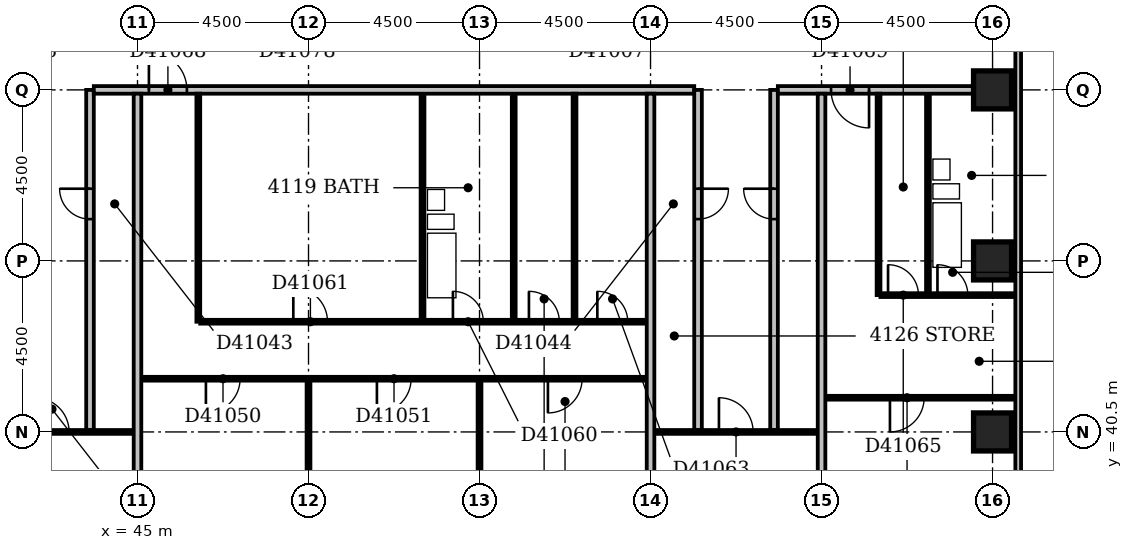
"""IFC4 building model, lengths in metres.
Left out: names, types, materials, properties, quantities, classifications, styles, units other than length and angle.
Written with IfcOpenShell. Run it as: python <this file> out.ifc"""

import sys

from ifc_helpers import new_model, si_unit, direction, frame, frame_2d, origin, origin_2d, place, context, subcontext, project, spatial, rectangle, extrude, element, fill, save


model = new_model("IFC4")
c1 = context("Model", 3, precision=1e-05, world=origin(), true_north=direction((0.0, 1.0)))
c2 = subcontext(c1, "Body", "Model", "MODEL_VIEW")
j1 = project(units=[si_unit("LENGTHUNIT", "METRE"), si_unit("PLANEANGLEUNIT", "RADIAN")], contexts=[c1])
p1 = place(None, origin())
s1 = spatial("IfcSite", under=j1, at=p1, CompositionType="ELEMENT")
p2 = place(p1, origin())
s2 = spatial("IfcBuilding", under=s1, at=p2, CompositionType="ELEMENT")
p3 = place(p2, frame((0.0, 0.0, 162.8)))
s3 = spatial("IfcBuildingStorey", under=s2, at=p3, CompositionType="ELEMENT", Elevation=162.8)
for number, where, z_axis, x_axis in (
    (1, (67.5, 40.5, -0.3), (0.0, 0.0, 1.0), (1.0, 0.0, 0.0)),
    (2, (67.5, 45.0, -0.3), (0.0, 0.0, 1.0), (1.0, 0.0, 0.0)),
    (3, (67.5, 49.5, -0.3), (0.0, 0.0, 1.0), (1.0, 0.0, 0.0)),
):
    element("IfcColumn", number, at=place(p3, frame(where, z_axis=z_axis, x_axis=x_axis)), inside=s3, PredefinedType="COLUMN", context=c2, shape_type="SweptSolid", body=[
        extrude(rectangle(XDim=1.0, YDim=1.0, at=origin_2d()), origin(), (0.0, 0.0, 1.0), 3.6),
    ])
p4 = place(p3, frame((68.175, 35.4, 0.0), z_axis=(0.0, 0.0, 1.0), x_axis=(0.0, 1.0, 0.0)))
e4 = element("IfcWall", 4, at=p4, inside=s3, PredefinedType="STANDARD", context=c2, shape_type="SweptSolid", body=[
    extrude(rectangle(XDim=23.85, YDim=0.15, at=frame_2d((11.925, 0.0))), origin(), (0.0, 0.0, 1.0), 2.7),
])
p5 = place(p4, frame((1.65, 0.0, 0.6)))
e5 = element("IfcOpeningElement", 5, at=p5, cuts=e4, PredefinedType="OPENING", context=c2, shape_type="SweptSolid", body=[
    extrude(rectangle(XDim=2.4, YDim=1.8, at=frame_2d((1.2, 0.9))), frame((0.0, 0.087, 0.0), z_axis=(0.0, -1.0, 0.0), x_axis=(1.0, 0.0, 0.0)), (0.0, 0.0, 1.0), 0.174),
])
p6 = place(p4, frame((19.65, 0.0, 0.6)))
e6 = element("IfcOpeningElement", 6, at=p6, cuts=e4, PredefinedType="OPENING", context=c2, shape_type="SweptSolid", body=[
    extrude(rectangle(XDim=2.4, YDim=1.8, at=frame_2d((1.2, 0.9))), frame((0.0, 0.087, 0.0), z_axis=(0.0, -1.0, 0.0), x_axis=(1.0, 0.0, 0.0)), (0.0, 0.0, 1.0), 0.174),
])
p7 = place(p3, frame((45.0, 36.5, 0.0), z_axis=(0.0, 0.0, 1.0), x_axis=(0.0, 1.0, 0.0)))
e7 = element("IfcWall", 7, at=p7, inside=s3, PredefinedType="PARTITIONING", context=c2, shape_type="SweptSolid", body=[
    extrude(rectangle(XDim=12.9, YDim=0.2, at=frame_2d((6.45, 0.0))), origin(), (0.0, 0.0, 1.0), 2.6),
])
p8 = place(p3, frame((49.5, 36.5, 0.0), z_axis=(0.0, 0.0, 1.0), x_axis=(0.0, 1.0, 0.0)))
e8 = element("IfcWall", 8, at=p8, inside=s3, PredefinedType="PARTITIONING", context=c2, shape_type="SweptSolid", body=[
    extrude(rectangle(XDim=5.35, YDim=0.1, at=frame_2d((2.675, 0.0))), origin(), (0.0, 0.0, 1.0), 3.3),
])
p9 = place(p3, frame((54.0, 36.5, 0.0), z_axis=(0.0, 0.0, 1.0), x_axis=(0.0, 1.0, 0.0)))
e9 = element("IfcWall", 9, at=p9, inside=s3, PredefinedType="PARTITIONING", context=c2, shape_type="SweptSolid", body=[
    extrude(rectangle(XDim=5.35, YDim=0.1, at=frame_2d((2.675, 0.0))), origin(), (0.0, 0.0, 1.0), 2.6),
])
p10 = place(p3, frame((58.5, 36.5, 0.0), z_axis=(0.0, 0.0, 1.0), x_axis=(0.0, 1.0, 0.0)))
e10 = element("IfcWall", 10, at=p10, inside=s3, PredefinedType="PARTITIONING", context=c2, shape_type="SweptSolid", body=[
    extrude(rectangle(XDim=12.9, YDim=0.2, at=frame_2d((6.45, 0.0))), origin(), (0.0, 0.0, 1.0), 3.3),
])
p11 = place(p3, frame((63.0, 36.5, 0.0), z_axis=(0.0, 0.0, 1.0), x_axis=(0.0, 1.0, 0.0)))
e11 = element("IfcWall", 11, at=p11, inside=s3, PredefinedType="PARTITIONING", context=c2, shape_type="SweptSolid", body=[
    extrude(rectangle(XDim=12.9, YDim=0.2, at=frame_2d((6.45, 0.0))), origin(), (0.0, 0.0, 1.0), 2.4),
])
p12 = place(p3, frame((40.6, 40.5, 0.0), z_axis=(0.0, 0.0, 1.0), x_axis=(1.0, 0.0, 0.0)))
e12 = element("IfcWall", 12, at=p12, inside=s3, PredefinedType="PARTITIONING", context=c2, shape_type="SweptSolid", body=[
    extrude(rectangle(XDim=4.3, YDim=0.1, at=frame_2d((2.15, 0.0))), origin(), (0.0, 0.0, 1.0), 3.3),
])
p13 = place(p12, frame((1.7, 0.0, 0.0)))
e13 = element("IfcOpeningElement", 13, at=p13, cuts=e12, PredefinedType="OPENING", context=c2, shape_type="SweptSolid", body=[
    extrude(rectangle(XDim=0.9, YDim=2.1, at=frame_2d((0.45, 1.05))), frame((0.0, 0.062, 0.0), z_axis=(0.0, -1.0, 0.0), x_axis=(1.0, 0.0, 0.0)), (0.0, 0.0, 1.0), 0.124),
])
p14 = place(p3, frame((58.6, 40.5, 0.0), z_axis=(0.0, 0.0, 1.0), x_axis=(1.0, 0.0, 0.0)))
e14 = element("IfcWall", 14, at=p14, inside=s3, PredefinedType="PARTITIONING", context=c2, shape_type="SweptSolid", body=[
    extrude(rectangle(XDim=4.3, YDim=0.1, at=frame_2d((2.15, 0.0))), origin(), (0.0, 0.0, 1.0), 3.3),
])
p15 = place(p14, frame((1.7, 0.0, 0.0)))
e15 = element("IfcOpeningElement", 15, at=p15, cuts=e14, PredefinedType="OPENING", context=c2, shape_type="SweptSolid", body=[
    extrude(rectangle(XDim=0.9, YDim=2.1, at=frame_2d((0.45, 1.05))), frame((0.0, 0.062, 0.0), z_axis=(0.0, -1.0, 0.0), x_axis=(1.0, 0.0, 0.0)), (0.0, 0.0, 1.0), 0.124),
])
p16 = place(p3, frame((43.75, 40.55, 0.0), z_axis=(0.0, 0.0, 1.0), x_axis=(0.0, 1.0, 0.0)))
e16 = element("IfcWall", 16, at=p16, inside=s3, PredefinedType="PARTITIONING", context=c2, shape_type="SweptSolid", body=[
    extrude(rectangle(XDim=8.95, YDim=0.2, at=frame_2d((4.475, 0.0))), origin(), (0.0, 0.0, 1.0), 3.3),
])
p17 = place(p16, frame((5.55, 0.0, 0.0)))
e17 = element("IfcOpeningElement", 17, at=p17, cuts=e16, PredefinedType="OPENING", context=c2, shape_type="SweptSolid", body=[
    extrude(rectangle(XDim=0.8, YDim=2.1, at=frame_2d((0.4, 1.05))), frame((0.0, 0.112, 0.0), z_axis=(0.0, -1.0, 0.0), x_axis=(1.0, 0.0, 0.0)), (0.0, 0.0, 1.0), 0.224),
])
p18 = place(p3, frame((59.75, 40.55, 0.0), z_axis=(0.0, 0.0, 1.0), x_axis=(0.0, 1.0, 0.0)))
e18 = element("IfcWall", 18, at=p18, inside=s3, PredefinedType="PARTITIONING", context=c2, shape_type="SweptSolid", body=[
    extrude(rectangle(XDim=8.95, YDim=0.2, at=frame_2d((4.475, 0.0))), origin(), (0.0, 0.0, 1.0), 3.3),
])
p19 = place(p18, frame((5.55, 0.0, 0.0)))
e19 = element("IfcOpeningElement", 19, at=p19, cuts=e18, PredefinedType="OPENING", context=c2, shape_type="SweptSolid", body=[
    extrude(rectangle(XDim=0.8, YDim=2.1, at=frame_2d((0.4, 1.05))), frame((0.0, 0.112, 0.0), z_axis=(0.0, -1.0, 0.0), x_axis=(1.0, 0.0, 0.0)), (0.0, 0.0, 1.0), 0.224),
])
p20 = place(p3, frame((61.75, 40.55, 0.0), z_axis=(0.0, 0.0, 1.0), x_axis=(0.0, 1.0, 0.0)))
e20 = element("IfcWall", 20, at=p20, inside=s3, PredefinedType="PARTITIONING", context=c2, shape_type="SweptSolid", body=[
    extrude(rectangle(XDim=8.95, YDim=0.2, at=frame_2d((4.475, 0.0))), origin(), (0.0, 0.0, 1.0), 3.3),
])
p21 = place(p20, frame((5.55, 0.0, 0.0)))
e21 = element("IfcOpeningElement", 21, at=p21, cuts=e20, PredefinedType="OPENING", context=c2, shape_type="SweptSolid", body=[
    extrude(rectangle(XDim=0.8, YDim=2.1, at=frame_2d((0.4, 1.05))), frame((0.0, 0.112, 0.0), z_axis=(0.0, -1.0, 0.0), x_axis=(1.0, 0.0, 0.0)), (0.0, 0.0, 1.0), 0.224),
])
p22 = place(p3, frame((63.1, 41.4, 0.0), z_axis=(0.0, 0.0, 1.0), x_axis=(1.0, 0.0, 0.0)))
e22 = element("IfcWall", 22, at=p22, inside=s3, PredefinedType="PARTITIONING", context=c2, shape_type="SweptSolid", body=[
    extrude(rectangle(XDim=5.0, YDim=0.1, at=frame_2d((2.5, 0.0))), origin(), (0.0, 0.0, 1.0), 3.3),
])
p23 = place(p22, frame((1.7, 0.0, 0.0)))
e23 = element("IfcOpeningElement", 23, at=p23, cuts=e22, PredefinedType="OPENING", context=c2, shape_type="SweptSolid", body=[
    extrude(rectangle(XDim=0.9, YDim=2.1, at=frame_2d((0.45, 1.05))), frame((0.0, 0.062, 0.0), z_axis=(0.0, -1.0, 0.0), x_axis=(1.0, 0.0, 0.0)), (0.0, 0.0, 1.0), 0.124),
])
p24 = place(p3, frame((45.1, 41.9, 0.0), z_axis=(0.0, 0.0, 1.0), x_axis=(1.0, 0.0, 0.0)))
e24 = element("IfcWall", 24, at=p24, inside=s3, PredefinedType="PARTITIONING", context=c2, shape_type="SweptSolid", body=[
    extrude(rectangle(XDim=13.3, YDim=0.1, at=frame_2d((6.65, 0.0))), origin(), (0.0, 0.0, 1.0), 3.3),
])
p25 = place(p24, frame((1.7, 0.0, 0.0)))
e25 = element("IfcOpeningElement", 25, at=p25, cuts=e24, PredefinedType="OPENING", context=c2, shape_type="SweptSolid", body=[
    extrude(rectangle(XDim=0.9, YDim=2.1, at=frame_2d((0.45, 1.05))), frame((0.0, 0.062, 0.0), z_axis=(0.0, -1.0, 0.0), x_axis=(1.0, 0.0, 0.0)), (0.0, 0.0, 1.0), 0.124),
])
p26 = place(p24, frame((6.2, 0.0, 0.0)))
e26 = element("IfcOpeningElement", 26, at=p26, cuts=e24, PredefinedType="OPENING", context=c2, shape_type="SweptSolid", body=[
    extrude(rectangle(XDim=0.9, YDim=2.1, at=frame_2d((0.45, 1.05))), frame((0.0, 0.062, 0.0), z_axis=(0.0, -1.0, 0.0), x_axis=(1.0, 0.0, 0.0)), (0.0, 0.0, 1.0), 0.124),
])
p27 = place(p24, frame((10.7, 0.0, 0.0)))
e27 = element("IfcOpeningElement", 27, at=p27, cuts=e24, PredefinedType="OPENING", context=c2, shape_type="SweptSolid", body=[
    extrude(rectangle(XDim=0.9, YDim=2.1, at=frame_2d((0.45, 1.05))), frame((0.0, 0.062, 0.0), z_axis=(0.0, -1.0, 0.0), x_axis=(1.0, 0.0, 0.0)), (0.0, 0.0, 1.0), 0.124),
])
p28 = place(p3, frame((46.6, 43.4, 0.0), z_axis=(0.0, 0.0, 1.0), x_axis=(0.0, 1.0, 0.0)))
e28 = element("IfcWall", 28, at=p28, inside=s3, PredefinedType="PARTITIONING", context=c2, shape_type="SweptSolid", body=[
    extrude(rectangle(XDim=6.0, YDim=0.1, at=frame_2d((3.0, 0.0))), origin(), (0.0, 0.0, 1.0), 3.3),
])
p29 = place(p3, frame((46.65, 43.4, 0.0), z_axis=(0.0, 0.0, 1.0), x_axis=(1.0, 0.0, 0.0)))
e29 = element("IfcWall", 29, at=p29, inside=s3, PredefinedType="PARTITIONING", context=c2, shape_type="SweptSolid", body=[
    extrude(rectangle(XDim=11.75, YDim=0.1, at=frame_2d((5.875, 0.0))), origin(), (0.0, 0.0, 1.0), 3.3),
])
p30 = place(p29, frame((6.65, 0.0, 0.0)))
e30 = element("IfcOpeningElement", 30, at=p30, cuts=e29, PredefinedType="OPENING", context=c2, shape_type="SweptSolid", body=[
    extrude(rectangle(XDim=0.8, YDim=2.1, at=frame_2d((0.4, 1.05))), frame((0.0, 0.062, 0.0), z_axis=(0.0, -1.0, 0.0), x_axis=(1.0, 0.0, 0.0)), (0.0, 0.0, 1.0), 0.124),
])
p31 = place(p29, frame((2.45, 0.0, 0.0)))
e31 = element("IfcOpeningElement", 31, at=p31, cuts=e29, PredefinedType="OPENING", context=c2, shape_type="SweptSolid", body=[
    extrude(rectangle(XDim=0.9, YDim=2.1, at=frame_2d((0.45, 1.05))), frame((0.0, 0.062, 0.0), z_axis=(0.0, -1.0, 0.0), x_axis=(1.0, 0.0, 0.0)), (0.0, 0.0, 1.0), 0.124),
])
p32 = place(p29, frame((8.65, 0.0, 0.0)))
e32 = element("IfcOpeningElement", 32, at=p32, cuts=e29, PredefinedType="OPENING", context=c2, shape_type="SweptSolid", body=[
    extrude(rectangle(XDim=0.8, YDim=2.1, at=frame_2d((0.4, 1.05))), frame((0.0, 0.062, 0.0), z_axis=(0.0, -1.0, 0.0), x_axis=(1.0, 0.0, 0.0)), (0.0, 0.0, 1.0), 0.124),
])
p33 = place(p29, frame((10.45, 0.0, 0.0)))
e33 = element("IfcOpeningElement", 33, at=p33, cuts=e29, PredefinedType="OPENING", context=c2, shape_type="SweptSolid", body=[
    extrude(rectangle(XDim=0.8, YDim=2.1, at=frame_2d((0.4, 1.05))), frame((0.0, 0.062, 0.0), z_axis=(0.0, -1.0, 0.0), x_axis=(1.0, 0.0, 0.0)), (0.0, 0.0, 1.0), 0.124),
])
for number, where, z_axis, x_axis in (
    (34, (52.5, 43.45, 0.0), (0.0, 0.0, 1.0), (0.0, 1.0, 0.0)),
    (35, (54.9, 43.45, 0.0), (0.0, 0.0, 1.0), (0.0, 1.0, 0.0)),
):
    element("IfcWall", number, at=place(p3, frame(where, z_axis=z_axis, x_axis=x_axis)), inside=s3, PredefinedType="PLUMBINGWALL", context=c2, shape_type="SweptSolid", body=[
        extrude(rectangle(XDim=5.95, YDim=0.1, at=frame_2d((2.975, 0.0))), origin(), (0.0, 0.0, 1.0), 3.3),
    ])
p34 = place(p3, frame((56.5, 43.45, 0.0), z_axis=(0.0, 0.0, 1.0), x_axis=(0.0, 1.0, 0.0)))
e36 = element("IfcWall", 36, at=p34, inside=s3, PredefinedType="PARTITIONING", context=c2, shape_type="SweptSolid", body=[
    extrude(rectangle(XDim=5.95, YDim=0.1, at=frame_2d((2.975, 0.0))), origin(), (0.0, 0.0, 1.0), 3.3),
])
p35 = place(p3, frame((64.5, 44.1, 0.0), z_axis=(0.0, 0.0, 1.0), x_axis=(0.0, 1.0, 0.0)))
e37 = element("IfcWall", 37, at=p35, inside=s3, PredefinedType="PARTITIONING", context=c2, shape_type="SweptSolid", body=[
    extrude(rectangle(XDim=5.3, YDim=0.1, at=frame_2d((2.65, 0.0))), origin(), (0.0, 0.0, 1.0), 3.3),
])
p36 = place(p3, frame((64.55, 44.1, 0.0), z_axis=(0.0, 0.0, 1.0), x_axis=(1.0, 0.0, 0.0)))
e38 = element("IfcWall", 38, at=p36, inside=s3, PredefinedType="PARTITIONING", context=c2, shape_type="SweptSolid", body=[
    extrude(rectangle(XDim=3.55, YDim=0.1, at=frame_2d((1.775, 0.0))), origin(), (0.0, 0.0, 1.0), 3.3),
])
p37 = place(p36, frame((1.5, 0.0, 0.0)))
e39 = element("IfcOpeningElement", 39, at=p37, cuts=e38, PredefinedType="OPENING", context=c2, shape_type="SweptSolid", body=[
    extrude(rectangle(XDim=0.8, YDim=2.1, at=frame_2d((0.4, 1.05))), frame((0.0, 0.062, 0.0), z_axis=(0.0, -1.0, 0.0), x_axis=(1.0, 0.0, 0.0)), (0.0, 0.0, 1.0), 0.124),
])
p38 = place(p36, frame((0.2, 0.0, 0.0)))
e40 = element("IfcOpeningElement", 40, at=p38, cuts=e38, PredefinedType="OPENING", context=c2, shape_type="SweptSolid", body=[
    extrude(rectangle(XDim=0.8, YDim=2.1, at=frame_2d((0.4, 1.05))), frame((0.0, 0.062, 0.0), z_axis=(0.0, -1.0, 0.0), x_axis=(1.0, 0.0, 0.0)), (0.0, 0.0, 1.0), 0.124),
])
p39 = place(p3, frame((65.8, 44.15, 0.0), z_axis=(0.0, 0.0, 1.0), x_axis=(0.0, 1.0, 0.0)))
e41 = element("IfcWall", 41, at=p39, inside=s3, PredefinedType="PLUMBINGWALL", context=c2, shape_type="SweptSolid", body=[
    extrude(rectangle(XDim=5.25, YDim=0.1, at=frame_2d((2.625, 0.0))), origin(), (0.0, 0.0, 1.0), 3.3),
])
p40 = place(p3, frame((43.85, 49.5, 0.0), z_axis=(0.0, 0.0, 1.0), x_axis=(1.0, 0.0, 0.0)))
e42 = element("IfcWall", 42, at=p40, inside=s3, PredefinedType="PARTITIONING", context=c2, shape_type="SweptSolid", body=[
    extrude(rectangle(XDim=15.8, YDim=0.2, at=frame_2d((7.9, 0.0))), origin(), (0.0, 0.0, 1.0), 3.3),
])
p41 = place(p40, frame((1.45, 0.0, 0.0)))
e43 = element("IfcOpeningElement", 43, at=p41, cuts=e42, PredefinedType="OPENING", context=c2, shape_type="SweptSolid", body=[
    extrude(rectangle(XDim=1.0, YDim=2.1, at=frame_2d((0.5, 1.05))), frame((0.0, 0.112, 0.0), z_axis=(0.0, -1.0, 0.0), x_axis=(1.0, 0.0, 0.0)), (0.0, 0.0, 1.0), 0.224),
])
p42 = place(p3, frame((61.85, 49.5, 0.0), z_axis=(0.0, 0.0, 1.0), x_axis=(1.0, 0.0, 0.0)))
e44 = element("IfcWall", 44, at=p42, inside=s3, PredefinedType="PARTITIONING", context=c2, shape_type="SweptSolid", body=[
    extrude(rectangle(XDim=5.15, YDim=0.2, at=frame_2d((2.575, 0.0))), origin(), (0.0, 0.0, 1.0), 3.3),
])
p43 = place(p42, frame((1.4, 0.0, 0.0)))
e45 = element("IfcOpeningElement", 45, at=p43, cuts=e44, PredefinedType="OPENING", context=c2, shape_type="SweptSolid", body=[
    extrude(rectangle(XDim=1.0, YDim=2.1, at=frame_2d((0.5, 1.05))), frame((0.0, 0.112, 0.0), z_axis=(0.0, -1.0, 0.0), x_axis=(1.0, 0.0, 0.0)), (0.0, 0.0, 1.0), 0.224),
])
p44 = place(p13, origin())
e46 = element("IfcDoor", 46, at=p44, inside=s3, OperationType="SINGLE_SWING_LEFT", PredefinedType="DOOR", context=c2, shape_type="SweptSolid", body=[
    extrude(rectangle(XDim=0.9, YDim=2.1, at=frame_2d((0.45, 1.05))), frame((0.0, 0.025, 0.0), z_axis=(0.0, -1.0, 0.0), x_axis=(1.0, 0.0, 0.0)), (0.0, 0.0, 1.0), 0.05),
])
fill(e13, e46)
p45 = place(p15, origin())
e47 = element("IfcDoor", 47, at=p45, inside=s3, OperationType="SINGLE_SWING_LEFT", PredefinedType="DOOR", context=c2, shape_type="SweptSolid", body=[
    extrude(rectangle(XDim=0.9, YDim=2.1, at=frame_2d((0.45, 1.05))), frame((0.0, 0.025, 0.0), z_axis=(0.0, -1.0, 0.0), x_axis=(1.0, 0.0, 0.0)), (0.0, 0.0, 1.0), 0.05),
])
fill(e15, e47)
p46 = place(p17, frame((0.8, 0.0, 0.0), z_axis=(0.0, 0.0, 1.0), x_axis=(-1.0, 0.0, 0.0)))
e48 = element("IfcDoor", 48, at=p46, inside=s3, OperationType="SINGLE_SWING_LEFT", PredefinedType="DOOR", context=c2, shape_type="SweptSolid", body=[
    extrude(rectangle(XDim=0.8, YDim=2.1, at=frame_2d((0.4, 1.05))), frame((0.0, 0.025, 0.0), z_axis=(0.0, -1.0, 0.0), x_axis=(1.0, 0.0, 0.0)), (0.0, 0.0, 1.0), 0.05),
])
fill(e17, e48)
p47 = place(p19, origin())
e49 = element("IfcDoor", 49, at=p47, inside=s3, OperationType="SINGLE_SWING_RIGHT", PredefinedType="DOOR", context=c2, shape_type="SweptSolid", body=[
    extrude(rectangle(XDim=0.8, YDim=2.1, at=frame_2d((0.4, 1.05))), frame((0.0, 0.025, 0.0), z_axis=(0.0, -1.0, 0.0), x_axis=(1.0, 0.0, 0.0)), (0.0, 0.0, 1.0), 0.05),
])
fill(e19, e49)
p48 = place(p21, frame((0.8, 0.0, 0.0), z_axis=(0.0, 0.0, 1.0), x_axis=(-1.0, 0.0, 0.0)))
e50 = element("IfcDoor", 50, at=p48, inside=s3, OperationType="SINGLE_SWING_LEFT", PredefinedType="DOOR", context=c2, shape_type="SweptSolid", body=[
    extrude(rectangle(XDim=0.8, YDim=2.1, at=frame_2d((0.4, 1.05))), frame((0.0, 0.025, 0.0), z_axis=(0.0, -1.0, 0.0), x_axis=(1.0, 0.0, 0.0)), (0.0, 0.0, 1.0), 0.05),
])
fill(e21, e50)
p49 = place(p23, frame((0.9, 0.0, 0.0), z_axis=(0.0, 0.0, 1.0), x_axis=(-1.0, 0.0, 0.0)))
e51 = element("IfcDoor", 51, at=p49, inside=s3, OperationType="SINGLE_SWING_RIGHT", PredefinedType="DOOR", context=c2, shape_type="SweptSolid", body=[
    extrude(rectangle(XDim=0.9, YDim=2.1, at=frame_2d((0.45, 1.05))), frame((0.0, 0.025, 0.0), z_axis=(0.0, -1.0, 0.0), x_axis=(1.0, 0.0, 0.0)), (0.0, 0.0, 1.0), 0.05),
])
fill(e23, e51)
p50 = place(p25, frame((0.9, 0.0, 0.0), z_axis=(0.0, 0.0, 1.0), x_axis=(-1.0, 0.0, 0.0)))
e52 = element("IfcDoor", 52, at=p50, inside=s3, OperationType="SINGLE_SWING_RIGHT", PredefinedType="DOOR", context=c2, shape_type="SweptSolid", body=[
    extrude(rectangle(XDim=0.9, YDim=2.1, at=frame_2d((0.45, 1.05))), frame((0.0, 0.025, 0.0), z_axis=(0.0, -1.0, 0.0), x_axis=(1.0, 0.0, 0.0)), (0.0, 0.0, 1.0), 0.05),
])
fill(e25, e52)
p51 = place(p26, frame((0.9, 0.0, 0.0), z_axis=(0.0, 0.0, 1.0), x_axis=(-1.0, 0.0, 0.0)))
e53 = element("IfcDoor", 53, at=p51, inside=s3, OperationType="SINGLE_SWING_RIGHT", PredefinedType="DOOR", context=c2, shape_type="SweptSolid", body=[
    extrude(rectangle(XDim=0.9, YDim=2.1, at=frame_2d((0.45, 1.05))), frame((0.0, 0.025, 0.0), z_axis=(0.0, -1.0, 0.0), x_axis=(1.0, 0.0, 0.0)), (0.0, 0.0, 1.0), 0.05),
])
fill(e26, e53)
p52 = place(p27, frame((0.9, 0.0, 0.0), z_axis=(0.0, 0.0, 1.0), x_axis=(-1.0, 0.0, 0.0)))
e54 = element("IfcDoor", 54, at=p52, inside=s3, OperationType="SINGLE_SWING_RIGHT", PredefinedType="DOOR", context=c2, shape_type="SweptSolid", body=[
    extrude(rectangle(XDim=0.9, YDim=2.1, at=frame_2d((0.45, 1.05))), frame((0.0, 0.025, 0.0), z_axis=(0.0, -1.0, 0.0), x_axis=(1.0, 0.0, 0.0)), (0.0, 0.0, 1.0), 0.05),
])
fill(e27, e54)
p53 = place(p30, origin())
e55 = element("IfcDoor", 55, at=p53, inside=s3, OperationType="SINGLE_SWING_LEFT", PredefinedType="DOOR", context=c2, shape_type="SweptSolid", body=[
    extrude(rectangle(XDim=0.8, YDim=2.1, at=frame_2d((0.4, 1.05))), frame((0.0, 0.025, 0.0), z_axis=(0.0, -1.0, 0.0), x_axis=(1.0, 0.0, 0.0)), (0.0, 0.0, 1.0), 0.05),
])
fill(e30, e55)
p54 = place(p31, origin())
e56 = element("IfcDoor", 56, at=p54, inside=s3, OperationType="SINGLE_SWING_LEFT", PredefinedType="DOOR", context=c2, shape_type="SweptSolid", body=[
    extrude(rectangle(XDim=0.9, YDim=2.1, at=frame_2d((0.45, 1.05))), frame((0.0, 0.025, 0.0), z_axis=(0.0, -1.0, 0.0), x_axis=(1.0, 0.0, 0.0)), (0.0, 0.0, 1.0), 0.05),
])
fill(e31, e56)
p55 = place(p32, origin())
e57 = element("IfcDoor", 57, at=p55, inside=s3, OperationType="SINGLE_SWING_LEFT", PredefinedType="DOOR", context=c2, shape_type="SweptSolid", body=[
    extrude(rectangle(XDim=0.8, YDim=2.1, at=frame_2d((0.4, 1.05))), frame((0.0, 0.025, 0.0), z_axis=(0.0, -1.0, 0.0), x_axis=(1.0, 0.0, 0.0)), (0.0, 0.0, 1.0), 0.05),
])
fill(e32, e57)
p56 = place(p33, origin())
e58 = element("IfcDoor", 58, at=p56, inside=s3, OperationType="SINGLE_SWING_LEFT", PredefinedType="DOOR", context=c2, shape_type="SweptSolid", body=[
    extrude(rectangle(XDim=0.8, YDim=2.1, at=frame_2d((0.4, 1.05))), frame((0.0, 0.025, 0.0), z_axis=(0.0, -1.0, 0.0), x_axis=(1.0, 0.0, 0.0)), (0.0, 0.0, 1.0), 0.05),
])
fill(e33, e58)
p57 = place(p37, origin())
e59 = element("IfcDoor", 59, at=p57, inside=s3, OperationType="SINGLE_SWING_LEFT", PredefinedType="DOOR", context=c2, shape_type="SweptSolid", body=[
    extrude(rectangle(XDim=0.8, YDim=2.1, at=frame_2d((0.4, 1.05))), frame((0.0, 0.025, 0.0), z_axis=(0.0, -1.0, 0.0), x_axis=(1.0, 0.0, 0.0)), (0.0, 0.0, 1.0), 0.05),
])
fill(e39, e59)
p58 = place(p38, origin())
e60 = element("IfcDoor", 60, at=p58, inside=s3, OperationType="SINGLE_SWING_LEFT", PredefinedType="DOOR", context=c2, shape_type="SweptSolid", body=[
    extrude(rectangle(XDim=0.8, YDim=2.1, at=frame_2d((0.4, 1.05))), frame((0.0, 0.025, 0.0), z_axis=(0.0, -1.0, 0.0), x_axis=(1.0, 0.0, 0.0)), (0.0, 0.0, 1.0), 0.05),
])
fill(e40, e60)
p59 = place(p41, origin())
e61 = element("IfcDoor", 61, at=p59, inside=s3, OperationType="SINGLE_SWING_LEFT", PredefinedType="DOOR", context=c2, shape_type="SweptSolid", body=[
    extrude(rectangle(XDim=1.0, YDim=2.1, at=frame_2d((0.5, 1.05))), frame((0.0, 0.025, 0.0), z_axis=(0.0, -1.0, 0.0), x_axis=(1.0, 0.0, 0.0)), (0.0, 0.0, 1.0), 0.05),
])
fill(e43, e61)
p60 = place(p43, origin())
e62 = element("IfcDoor", 62, at=p60, inside=s3, OperationType="SINGLE_SWING_RIGHT", PredefinedType="DOOR", context=c2, shape_type="SweptSolid", body=[
    extrude(rectangle(XDim=1.0, YDim=2.1, at=frame_2d((0.5, 1.05))), frame((0.0, 0.025, 0.0), z_axis=(0.0, -1.0, 0.0), x_axis=(1.0, 0.0, 0.0)), (0.0, 0.0, 1.0), 0.05),
])
fill(e45, e62)
save(model, sys.argv[1])
